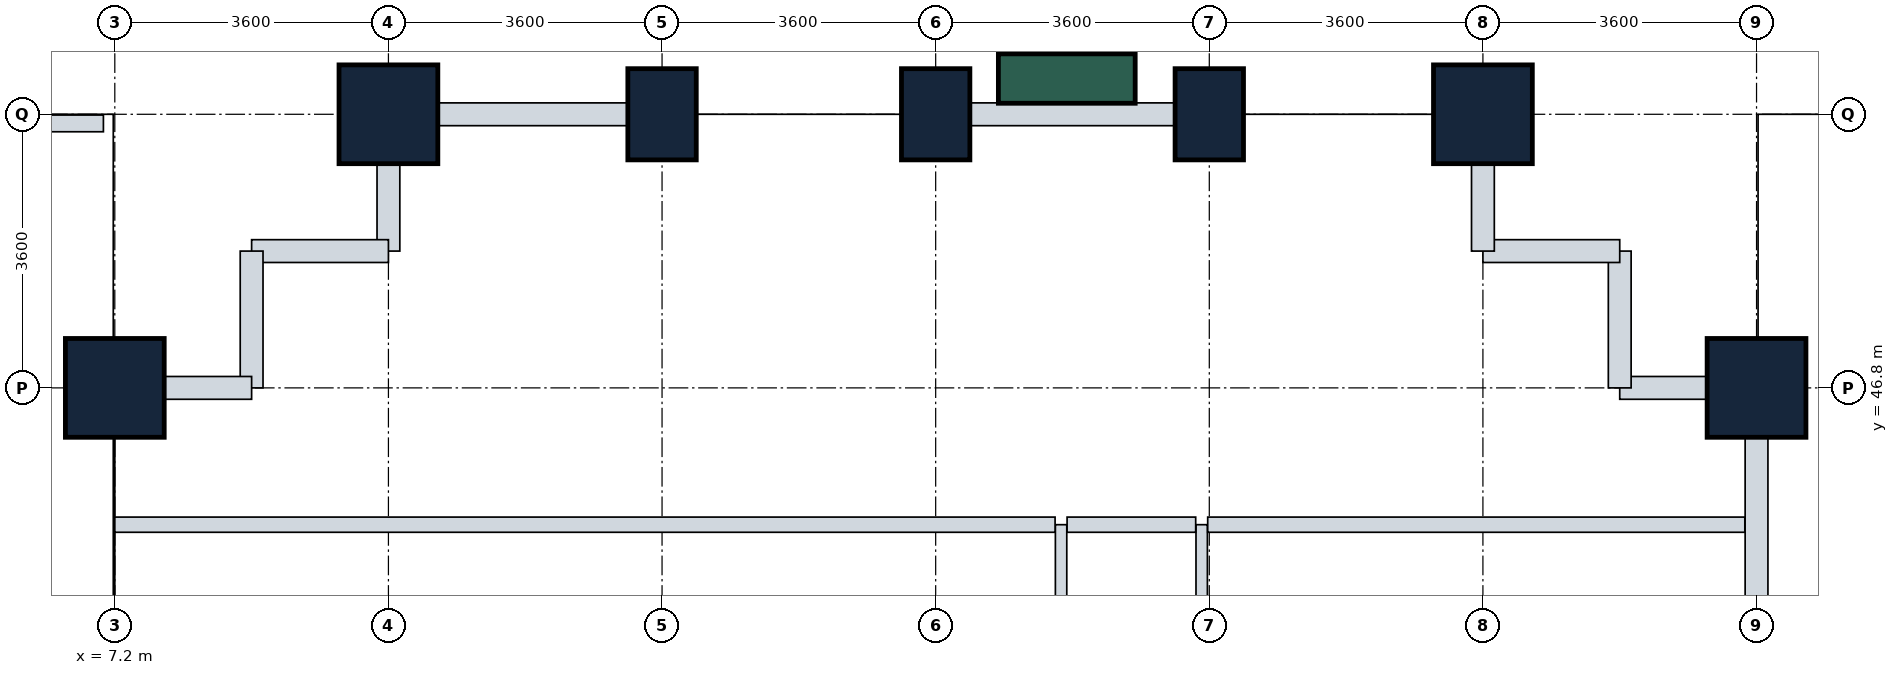
"""IFC4 building model, lengths in metres.
Left out: names, types, materials, properties, quantities, classifications, styles, units other than length and angle.
Written with IfcOpenShell. Run it as: python <this file> out.ifc"""

import sys

from ifc_helpers import new_model, si_unit, direction, frame, frame_2d, origin, origin_2d, place, context, subcontext, project, spatial, rectangle, extrude, element, fill, save


model = new_model("IFC4")
c1 = context("Model", 3, precision=1e-05, world=origin(), true_north=direction((0.0, 1.0)))
c2 = subcontext(c1, "Body", "Model", "MODEL_VIEW")
j1 = project(units=[si_unit("LENGTHUNIT", "METRE"), si_unit("PLANEANGLEUNIT", "RADIAN")], contexts=[c1])
p1 = place(None, origin())
s1 = spatial("IfcSite", under=j1, at=p1, CompositionType="ELEMENT")
p2 = place(p1, origin())
s2 = spatial("IfcBuilding", under=s1, at=p2, CompositionType="ELEMENT")
p3 = place(p2, frame((0.0, 0.0, 24.0)))
s3 = spatial("IfcBuildingStorey", under=s2, at=p3, CompositionType="ELEMENT", Elevation=24.0)
for number, where, z_axis, x_axis in (
    (1, (7.2, 46.8, 0.0), (0.0, 0.0, 1.0), (0.0, 1.0, 0.0)),
    (2, (10.8, 50.4, 0.0), (0.0, 0.0, 1.0), (1.0, 0.0, 0.0)),
):
    element("IfcColumn", number, at=place(p3, frame(where, z_axis=z_axis, x_axis=x_axis)), inside=s3, PredefinedType="COLUMN", context=c2, shape_type="SweptSolid", body=[
        extrude(rectangle(XDim=1.3, YDim=1.3, at=origin_2d()), origin(), (0.0, 0.0, 1.0), 3.9),
    ])
for number, where, z_axis, x_axis in (
    (3, (14.4, 50.4, 0.0), (0.0, 0.0, 1.0), (1.0, 0.0, 0.0)),
    (4, (18.0, 50.4, 0.0), (0.0, 0.0, 1.0), (1.0, 0.0, 0.0)),
    (5, (21.6, 50.4, 0.0), (0.0, 0.0, 1.0), (1.0, 0.0, 0.0)),
):
    element("IfcColumn", number, at=place(p3, frame(where, z_axis=z_axis, x_axis=x_axis)), inside=s3, PredefinedType="COLUMN", context=c2, shape_type="SweptSolid", body=[
        extrude(rectangle(XDim=0.9, YDim=1.2, at=origin_2d()), origin(), (0.0, 0.0, 1.0), 3.9),
    ])
for number, where, z_axis, x_axis in (
    (6, (25.2, 50.4, 0.0), (0.0, 0.0, 1.0), (1.0, 0.0, 0.0)),
    (7, (28.8, 46.8, 0.0), (0.0, 0.0, 1.0), (0.0, 1.0, 0.0)),
):
    element("IfcColumn", number, at=place(p3, frame(where, z_axis=z_axis, x_axis=x_axis)), inside=s3, PredefinedType="COLUMN", context=c2, shape_type="SweptSolid", body=[
        extrude(rectangle(XDim=1.3, YDim=1.3, at=origin_2d()), origin(), (0.0, 0.0, 1.0), 3.9),
    ])
p4 = place(p3, frame((7.05, 50.28, 0.0), z_axis=(0.0, 0.0, 1.0), x_axis=(-1.0, 0.0, 0.0)))
e8 = element("IfcWall", 8, at=p4, inside=s3, PredefinedType="PARAPET", context=c2, shape_type="SweptSolid", body=[
    extrude(rectangle(XDim=6.93, YDim=0.22, at=frame_2d((3.465, 0.0))), origin(), (0.0, 0.0, 1.0), 1.15),
])
p5 = place(p3, frame((28.8, 43.2, 0.0), z_axis=(0.0, 0.0, 1.0), x_axis=(0.0, 1.0, 0.0)))
e9 = element("IfcWall", 9, at=p5, inside=s3, PredefinedType="STANDARD", context=c2, shape_type="SweptSolid", body=[
    extrude(rectangle(XDim=3.6, YDim=0.3, at=frame_2d((1.8, 0.0))), origin(), (0.0, 0.0, 1.0), 2.93),
])
p6 = place(p3, frame((27.0, 46.8, 0.0), z_axis=(0.0, 0.0, 1.0), x_axis=(1.0, 0.0, 0.0)))
e10 = element("IfcWall", 10, at=p6, inside=s3, PredefinedType="STANDARD", context=c2, shape_type="SweptSolid", body=[
    extrude(rectangle(XDim=1.8, YDim=0.3, at=frame_2d((0.9, 0.0))), origin(), (0.0, 0.0, 1.0), 2.93),
])
for number, where, z_axis, x_axis in (
    (11, (27.0, 46.8, 0.0), (0.0, 0.0, 1.0), (0.0, 1.0, 0.0)),
    (12, (25.2, 48.6, 0.0), (0.0, 0.0, 1.0), (1.0, 0.0, 0.0)),
):
    element("IfcWall", number, at=place(p3, frame(where, z_axis=z_axis, x_axis=x_axis)), inside=s3, PredefinedType="STANDARD", context=c2, shape_type="SweptSolid", body=[
        extrude(rectangle(XDim=1.8, YDim=0.3, at=frame_2d((0.9, 0.0))), origin(), (0.0, 0.0, 1.0), 3.635),
    ])
p7 = place(p3, frame((25.2, 48.6, 0.0), z_axis=(0.0, 0.0, 1.0), x_axis=(0.0, 1.0, 0.0)))
e13 = element("IfcWall", 13, at=p7, inside=s3, PredefinedType="STANDARD", context=c2, shape_type="SweptSolid", body=[
    extrude(rectangle(XDim=1.8, YDim=0.3, at=frame_2d((0.9, 0.0))), origin(), (0.0, 0.0, 1.0), 2.93),
])
p8 = place(p3, frame((18.0, 50.4, 0.0), z_axis=(0.0, 0.0, 1.0), x_axis=(1.0, 0.0, 0.0)))
e14 = element("IfcWall", 14, at=p8, inside=s3, PredefinedType="STANDARD", context=c2, shape_type="SweptSolid", body=[
    extrude(rectangle(XDim=3.6, YDim=0.3, at=frame_2d((1.8, 0.0))), origin(), (0.0, 0.0, 1.0), 2.93),
])
p9 = place(p8, frame((0.825, 0.0, 0.85)))
e15 = element("IfcOpeningElement", 15, at=p9, cuts=e14, PredefinedType="OPENING", context=c2, shape_type="SweptSolid", body=[
    extrude(rectangle(XDim=1.8, YDim=1.35, at=frame_2d((0.9, 0.675))), frame((0.0, 0.16, 0.0), z_axis=(0.0, -1.0, 0.0), x_axis=(1.0, 0.0, 0.0)), (0.0, 0.0, 1.0), 0.32),
])
p10 = place(p3, frame((10.8, 50.4, 0.0), z_axis=(0.0, 0.0, 1.0), x_axis=(1.0, 0.0, 0.0)))
e16 = element("IfcWall", 16, at=p10, inside=s3, PredefinedType="STANDARD", context=c2, shape_type="SweptSolid", body=[
    extrude(rectangle(XDim=3.6, YDim=0.3, at=frame_2d((1.8, 0.0))), origin(), (0.0, 0.0, 1.0), 2.93),
])
p11 = place(p3, frame((10.8, 48.6, 0.0), z_axis=(0.0, 0.0, 1.0), x_axis=(0.0, 1.0, 0.0)))
e17 = element("IfcWall", 17, at=p11, inside=s3, PredefinedType="STANDARD", context=c2, shape_type="SweptSolid", body=[
    extrude(rectangle(XDim=1.8, YDim=0.3, at=frame_2d((0.9, 0.0))), origin(), (0.0, 0.0, 1.0), 2.93),
])
for number, where, z_axis, x_axis in (
    (18, (9.0, 48.6, 0.0), (0.0, 0.0, 1.0), (1.0, 0.0, 0.0)),
    (19, (9.0, 46.8, 0.0), (0.0, 0.0, 1.0), (0.0, 1.0, 0.0)),
):
    element("IfcWall", number, at=place(p3, frame(where, z_axis=z_axis, x_axis=x_axis)), inside=s3, PredefinedType="STANDARD", context=c2, shape_type="SweptSolid", body=[
        extrude(rectangle(XDim=1.8, YDim=0.3, at=frame_2d((0.9, 0.0))), origin(), (0.0, 0.0, 1.0), 3.635),
    ])
p12 = place(p3, frame((7.2, 46.8, 0.0), z_axis=(0.0, 0.0, 1.0), x_axis=(1.0, 0.0, 0.0)))
e20 = element("IfcWall", 20, at=p12, inside=s3, PredefinedType="STANDARD", context=c2, shape_type="SweptSolid", body=[
    extrude(rectangle(XDim=1.8, YDim=0.3, at=frame_2d((0.9, 0.0))), origin(), (0.0, 0.0, 1.0), 2.93),
])
p13 = place(p3, frame((19.65, 34.329, 0.0), z_axis=(0.0, 0.0, 1.0), x_axis=(0.0, 1.0, 0.0)))
e21 = element("IfcWall", 21, at=p13, inside=s3, PredefinedType="PARTITIONING", context=c2, shape_type="SweptSolid", body=[
    extrude(rectangle(XDim=10.671, YDim=0.15, at=frame_2d((5.335, 0.0))), origin(), (0.0, 0.0, 1.0), 3.08),
])
p14 = place(p13, frame((7.953, 0.0, 0.0)))
e22 = element("IfcOpeningElement", 22, at=p14, cuts=e21, PredefinedType="OPENING", context=c2, shape_type="SweptSolid", body=[
    extrude(rectangle(XDim=1.0, YDim=2.1, at=frame_2d((0.5, 1.05))), frame((0.0, 0.085, 0.0), z_axis=(0.0, -1.0, 0.0), x_axis=(1.0, 0.0, 0.0)), (0.0, 0.0, 1.0), 0.17),
])
p15 = place(p3, frame((21.5, 35.979, 0.0), z_axis=(0.0, 0.0, 1.0), x_axis=(0.0, 1.0, 0.0)))
e23 = element("IfcWall", 23, at=p15, inside=s3, PredefinedType="PARTITIONING", context=c2, shape_type="SweptSolid", body=[
    extrude(rectangle(XDim=9.021, YDim=0.15, at=frame_2d((4.51, 0.0))), origin(), (0.0, 0.0, 1.0), 3.03),
])
p16 = place(p15, frame((3.931, 0.0, 0.0)))
e24 = element("IfcOpeningElement", 24, at=p16, cuts=e23, PredefinedType="OPENING", context=c2, shape_type="SweptSolid", body=[
    extrude(rectangle(XDim=1.0, YDim=2.1, at=frame_2d((0.5, 1.05))), frame((0.0, 0.085, 0.0), z_axis=(0.0, -1.0, 0.0), x_axis=(1.0, 0.0, 0.0)), (0.0, 0.0, 1.0), 0.17),
])
p17 = place(p3, frame((7.2, 45.0, 0.0), z_axis=(0.0, 0.0, 1.0), x_axis=(1.0, 0.0, 0.0)))
e25 = element("IfcWall", 25, at=p17, inside=s3, PredefinedType="PARTITIONING", context=c2, shape_type="SweptSolid", body=[
    extrude(rectangle(XDim=12.371, YDim=0.2, at=frame_2d((6.186, 0.0))), origin(), (0.0, 0.0, 1.0), 2.93),
])
p18 = place(p3, frame((21.579, 45.0, 0.0), z_axis=(0.0, 0.0, 1.0), x_axis=(1.0, 0.0, 0.0)))
e26 = element("IfcWall", 26, at=p18, inside=s3, PredefinedType="PARTITIONING", context=c2, shape_type="SweptSolid", body=[
    extrude(rectangle(XDim=7.067, YDim=0.2, at=frame_2d((3.533, 0.0))), origin(), (0.0, 0.0, 1.0), 2.93),
])
p19 = place(p3, frame((19.729, 45.0, 0.0), z_axis=(0.0, 0.0, 1.0), x_axis=(1.0, 0.0, 0.0)))
e27 = element("IfcWall", 27, at=p19, inside=s3, PredefinedType="PARTITIONING", context=c2, shape_type="SweptSolid", body=[
    extrude(rectangle(XDim=1.692, YDim=0.2, at=frame_2d((0.846, 0.0))), origin(), (0.0, 0.0, 1.0), 3.635),
])
p20 = place(p19, frame((0.339, 0.0, 0.0)))
e28 = element("IfcOpeningElement", 28, at=p20, cuts=e27, PredefinedType="OPENING", context=c2, shape_type="SweptSolid", body=[
    extrude(rectangle(XDim=1.0, YDim=2.1, at=frame_2d((0.5, 1.05))), frame((0.0, 0.11, 0.0), z_axis=(0.0, -1.0, 0.0), x_axis=(1.0, 0.0, 0.0)), (0.0, 0.0, 1.0), 0.22),
])
p21 = place(p9, origin())
e29 = element("IfcWindow", 29, at=p21, inside=s3, PartitioningType="SINGLE_PANEL", PredefinedType="WINDOW", context=c2, shape_type="SweptSolid", body=[
    extrude(rectangle(XDim=1.8, YDim=1.35, at=frame_2d((0.9, 0.675))), frame((0.0, 0.03, 0.0), z_axis=(0.0, -1.0, 0.0), x_axis=(1.0, 0.0, 0.0)), (0.0, 0.0, 1.0), 0.06),
])
fill(e15, e29)
p22 = place(p20, origin())
e30 = element("IfcDoor", 30, at=p22, inside=s3, OperationType="SINGLE_SWING_LEFT", PredefinedType="DOOR", context=c2, shape_type="SweptSolid", body=[
    extrude(rectangle(XDim=1.0, YDim=2.1, at=frame_2d((0.5, 1.05))), frame((0.0, 0.025, 0.0), z_axis=(0.0, -1.0, 0.0), x_axis=(1.0, 0.0, 0.0)), (0.0, 0.0, 1.0), 0.05),
])
fill(e28, e30)
save(model, sys.argv[1])
